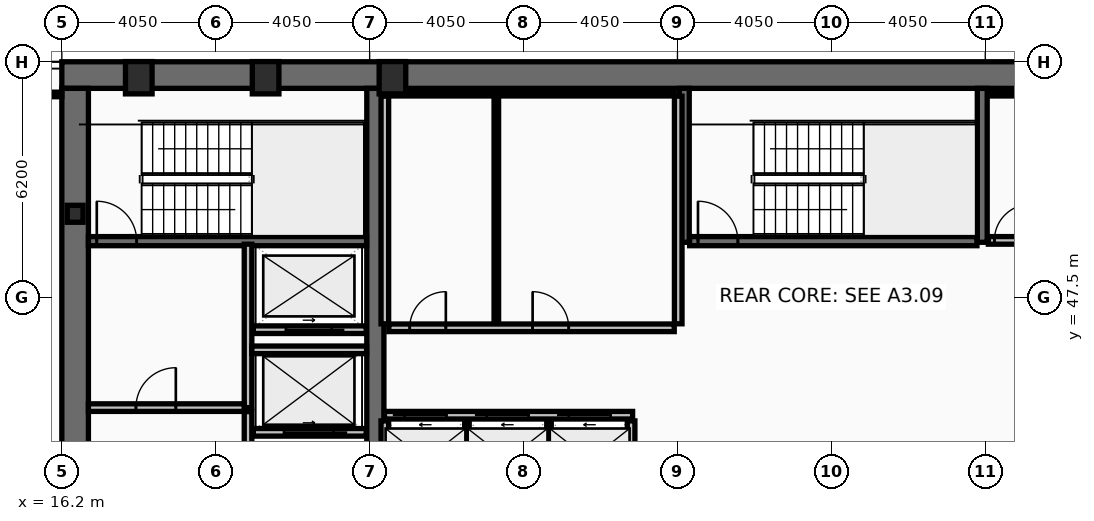
"""IFC4 building model, lengths in metres.
Left out: names, types, materials, properties, quantities, classifications, styles, units other than length and angle.
Written with IfcOpenShell. Run it as: python <this file> out.ifc"""

import sys

from ifc_helpers import new_model, si_unit, direction, frame, frame_2d, origin, origin_2d, place, context, subcontext, project, spatial, rectangle, hollow_rectangle, i_section, extrude, element, fill, save


model = new_model("IFC4")
c1 = context("Model", 3, precision=1e-05, world=origin(), true_north=direction((0.0, 1.0)))
c2 = subcontext(c1, "Body", "Model", "MODEL_VIEW")
j1 = project(units=[si_unit("LENGTHUNIT", "METRE"), si_unit("PLANEANGLEUNIT", "RADIAN")], contexts=[c1])
p1 = place(None, origin())
s1 = spatial("IfcSite", under=j1, at=p1, CompositionType="ELEMENT")
p2 = place(p1, origin())
s2 = spatial("IfcBuilding", under=s1, at=p2, CompositionType="ELEMENT")
p3 = place(p2, frame((0.0, 0.0, 125.4)))
s3 = spatial("IfcBuildingStorey", under=s2, at=p3, CompositionType="ELEMENT", Elevation=125.4)
p4 = place(p3, frame((16.2, 53.35, 0.0), z_axis=(0.0, 0.0, 1.0), x_axis=(1.0, 0.0, 0.0)))
e1 = element("IfcWall", 1, at=p4, inside=s3, PredefinedType="SHEAR", context=c2, shape_type="SweptSolid", body=[
    extrude(rectangle(XDim=40.5, YDim=0.7, at=frame_2d((20.25, 0.0))), origin(), (0.0, 0.0, 1.0), 3.44),
])
p5 = place(p3, frame((16.55, 42.0, 0.0), z_axis=(0.0, 0.0, 1.0), x_axis=(0.0, 1.0, 0.0)))
e2 = element("IfcWall", 2, at=p5, inside=s3, PredefinedType="SHEAR", context=c2, shape_type="SweptSolid", body=[
    extrude(rectangle(XDim=11.0, YDim=0.7, at=frame_2d((5.5, 0.0))), origin(), (0.0, 0.0, 1.0), 3.44),
])
p6 = place(p3, frame((24.45, 42.0, 0.0), z_axis=(0.0, 0.0, 1.0), x_axis=(0.0, 1.0, 0.0)))
e3 = element("IfcWall", 3, at=p6, inside=s3, PredefinedType="SHEAR", context=c2, shape_type="SweptSolid", body=[
    extrude(rectangle(XDim=11.0, YDim=0.45, at=frame_2d((5.5, 0.0))), origin(), (0.0, 0.0, 1.0), 3.44),
])
for number, where, z_axis, x_axis in (
    (4, (32.58, 48.95, 0.0), (0.0, 0.0, 1.0), (0.0, 1.0, 0.0)),
    (5, (40.42, 48.95, 0.0), (0.0, 0.0, 1.0), (0.0, 1.0, 0.0)),
):
    element("IfcWall", number, at=place(p3, frame(where, z_axis=z_axis, x_axis=x_axis)), inside=s3, PredefinedType="SHEAR", context=c2, shape_type="SweptSolid", body=[
        extrude(rectangle(XDim=4.05, YDim=0.26, at=frame_2d((2.025, 0.0))), origin(), (0.0, 0.0, 1.0), 3.44),
    ])
p7 = place(p3, frame((16.9, 48.98, 0.0), z_axis=(0.0, 0.0, 1.0), x_axis=(1.0, 0.0, 0.0)))
e6 = element("IfcWall", 6, at=p7, inside=s3, PredefinedType="SHEAR", context=c2, shape_type="SweptSolid", body=[
    extrude(rectangle(XDim=7.32, YDim=0.24, at=frame_2d((3.66, 0.0))), origin(), (0.0, 0.0, 1.0), 3.44),
])
p8 = place(p7, frame((0.22, 0.0, 0.0)))
e7 = element("IfcOpeningElement", 7, at=p8, cuts=e6, PredefinedType="OPENING", context=c2, shape_type="SweptSolid", body=[
    extrude(rectangle(XDim=1.05, YDim=2.15, at=frame_2d((0.525, 1.075))), frame((0.0, 0.13, 0.0), z_axis=(0.0, -1.0, 0.0), x_axis=(1.0, 0.0, 0.0)), (0.0, 0.0, 1.0), 0.26),
])
p9 = place(p3, frame((32.72, 48.98, 0.0), z_axis=(0.0, 0.0, 1.0), x_axis=(1.0, 0.0, 0.0)))
e8 = element("IfcWall", 8, at=p9, inside=s3, PredefinedType="SHEAR", context=c2, shape_type="SweptSolid", body=[
    extrude(rectangle(XDim=7.56, YDim=0.24, at=frame_2d((3.78, 0.0))), origin(), (0.0, 0.0, 1.0), 3.44),
])
p10 = place(p9, frame((0.22, 0.0, 0.0)))
e9 = element("IfcOpeningElement", 9, at=p10, cuts=e8, PredefinedType="OPENING", context=c2, shape_type="SweptSolid", body=[
    extrude(rectangle(XDim=1.05, YDim=2.15, at=frame_2d((0.525, 1.075))), frame((0.0, 0.13, 0.0), z_axis=(0.0, -1.0, 0.0), x_axis=(1.0, 0.0, 0.0)), (0.0, 0.0, 1.0), 0.26),
])
for number, where, z_axis, x_axis in (
    (10, (18.225, 53.28, 0.0), (0.0, 0.0, 1.0), (1.0, 0.0, 0.0)),
    (11, (21.562, 53.28, 0.0), (0.0, 0.0, 1.0), (1.0, 0.0, 0.0)),
    (12, (24.9, 53.28, 0.0), (0.0, 0.0, 1.0), (1.0, 0.0, 0.0)),
):
    element("IfcColumn", number, at=place(p3, frame(where, z_axis=z_axis, x_axis=x_axis)), inside=s3, PredefinedType="COLUMN", context=c2, shape_type="SweptSolid", body=[
        extrude(hollow_rectangle(XDim=0.7, YDim=0.85, WallThickness=0.05, at=origin_2d()), origin(), (0.0, 0.0, 1.0), 3.6),
    ])
p11 = place(p3, frame((16.55, 49.7, 0.0), z_axis=(0.0, 0.0, 1.0), x_axis=(1.0, 0.0, 0.0)))
e13 = element("IfcColumn", 13, at=p11, inside=s3, PredefinedType="COLUMN", context=c2, shape_type="SweptSolid", body=[
    extrude(i_section(OverallWidth=0.416, OverallDepth=0.446, WebThickness=0.039, FlangeThickness=0.063, at=origin_2d()), origin(), (0.0, 0.0, 1.0), 3.6),
])
p12 = place(p3, frame((24.69, 44.4, 0.0), z_axis=(0.0, 0.0, 1.0), x_axis=(1.0, 0.0, 0.0)))
e14 = element("IfcWall", 14, at=p12, inside=s3, PredefinedType="PARTITIONING", context=c2, shape_type="SweptSolid", body=[
    extrude(rectangle(XDim=6.53, YDim=0.2, at=frame_2d((3.265, 0.0))), origin(), (0.0, 0.0, 1.0), 3.44),
])
p13 = place(p12, frame((0.53, 0.0, 0.0)))
e15 = element("IfcOpeningElement", 15, at=p13, cuts=e14, PredefinedType="OPENING", context=c2, shape_type="SweptSolid", body=[
    extrude(rectangle(XDim=1.1, YDim=2.18, at=frame_2d((0.55, 1.09))), frame((0.0, 0.11, 0.0), z_axis=(0.0, -1.0, 0.0), x_axis=(1.0, 0.0, 0.0)), (0.0, 0.0, 1.0), 0.22),
])
p14 = place(p12, frame((2.69, 0.0, 0.0)))
e16 = element("IfcOpeningElement", 16, at=p14, cuts=e14, PredefinedType="OPENING", context=c2, shape_type="SweptSolid", body=[
    extrude(rectangle(XDim=1.1, YDim=2.18, at=frame_2d((0.55, 1.09))), frame((0.0, 0.11, 0.0), z_axis=(0.0, -1.0, 0.0), x_axis=(1.0, 0.0, 0.0)), (0.0, 0.0, 1.0), 0.22),
])
p15 = place(p12, frame((4.85, 0.0, 0.0)))
e17 = element("IfcOpeningElement", 17, at=p15, cuts=e14, PredefinedType="OPENING", context=c2, shape_type="SweptSolid", body=[
    extrude(rectangle(XDim=1.1, YDim=2.18, at=frame_2d((0.55, 1.09))), frame((0.0, 0.11, 0.0), z_axis=(0.0, -1.0, 0.0), x_axis=(1.0, 0.0, 0.0)), (0.0, 0.0, 1.0), 0.22),
])
p16 = place(p3, frame((24.21, 43.95, 0.0), z_axis=(0.0, 0.0, 1.0), x_axis=(-1.0, 0.0, 0.0)))
e18 = element("IfcWall", 18, at=p16, inside=s3, PredefinedType="PARTITIONING", context=c2, shape_type="SweptSolid", body=[
    extrude(rectangle(XDim=2.97, YDim=0.2, at=frame_2d((1.485, 0.0))), origin(), (0.0, 0.0, 1.0), 3.44),
])
p17 = place(p16, frame((0.86, 0.0, 0.0)))
e19 = element("IfcOpeningElement", 19, at=p17, cuts=e18, PredefinedType="OPENING", context=c2, shape_type="SweptSolid", body=[
    extrude(rectangle(XDim=1.3, YDim=2.18, at=frame_2d((0.65, 1.09))), frame((0.0, 0.11, 0.0), z_axis=(0.0, -1.0, 0.0), x_axis=(1.0, 0.0, 0.0)), (0.0, 0.0, 1.0), 0.22),
])
p18 = place(p3, frame((24.21, 46.65, 0.0), z_axis=(0.0, 0.0, 1.0), x_axis=(-1.0, 0.0, 0.0)))
e20 = element("IfcWall", 20, at=p18, inside=s3, PredefinedType="PARTITIONING", context=c2, shape_type="SweptSolid", body=[
    extrude(rectangle(XDim=2.97, YDim=0.2, at=frame_2d((1.485, 0.0))), origin(), (0.0, 0.0, 1.0), 3.44),
])
p19 = place(p18, frame((0.91, 0.0, 0.0)))
e21 = element("IfcOpeningElement", 21, at=p19, cuts=e20, PredefinedType="OPENING", context=c2, shape_type="SweptSolid", body=[
    extrude(rectangle(XDim=1.2, YDim=2.18, at=frame_2d((0.6, 1.09))), frame((0.0, 0.11, 0.0), z_axis=(0.0, -1.0, 0.0), x_axis=(1.0, 0.0, 0.0)), (0.0, 0.0, 1.0), 0.22),
])
p20 = place(p3, frame((21.1, 44.6, 0.0), z_axis=(0.0, 0.0, 1.0), x_axis=(0.0, 1.0, 0.0)))
e22 = element("IfcWall", 22, at=p20, inside=s3, PredefinedType="PARTITIONING", context=c2, shape_type="SweptSolid", body=[
    extrude(rectangle(XDim=4.3, YDim=0.2, at=frame_2d((2.15, 0.0))), origin(), (0.0, 0.0, 1.0), 3.44),
])
p21 = place(p3, frame((16.9, 44.6, 0.0), z_axis=(0.0, 0.0, 1.0), x_axis=(1.0, 0.0, 0.0)))
e23 = element("IfcWall", 23, at=p21, inside=s3, PredefinedType="PARTITIONING", context=c2, shape_type="SweptSolid", body=[
    extrude(rectangle(XDim=4.1, YDim=0.2, at=frame_2d((2.05, 0.0))), origin(), (0.0, 0.0, 1.0), 3.44),
])
p22 = place(p21, frame((1.25, 0.0, 0.0)))
e24 = element("IfcOpeningElement", 24, at=p22, cuts=e23, PredefinedType="OPENING", context=c2, shape_type="SweptSolid", body=[
    extrude(rectangle(XDim=1.05, YDim=2.15, at=frame_2d((0.525, 1.075))), frame((0.0, 0.11, 0.0), z_axis=(0.0, -1.0, 0.0), x_axis=(1.0, 0.0, 0.0)), (0.0, 0.0, 1.0), 0.22),
])
p23 = place(p3, frame((21.2, 46.12, 0.0), z_axis=(0.0, 0.0, 1.0), x_axis=(1.0, 0.0, 0.0)))
e25 = element("IfcWall", 25, at=p23, inside=s3, PredefinedType="PARTITIONING", context=c2, shape_type="SweptSolid", body=[
    extrude(rectangle(XDim=3.02, YDim=0.2, at=frame_2d((1.51, 0.0))), origin(), (0.0, 0.0, 1.0), 3.44),
])
p24 = place(p3, frame((21.1, 42.0, 0.0), z_axis=(0.0, 0.0, 1.0), x_axis=(0.0, 1.0, 0.0)))
e26 = element("IfcWall", 26, at=p24, inside=s3, PredefinedType="PARTITIONING", context=c2, shape_type="SweptSolid", body=[
    extrude(rectangle(XDim=2.495, YDim=0.2, at=frame_2d((1.248, 0.0))), origin(), (0.0, 0.0, 1.0), 3.44),
])
p25 = place(p24, frame((0.38, 0.0, 0.0)))
e27 = element("IfcOpeningElement", 27, at=p25, cuts=e26, PredefinedType="OPENING", context=c2, shape_type="SweptSolid", body=[
    extrude(rectangle(XDim=1.05, YDim=2.15, at=frame_2d((0.525, 1.075))), frame((0.0, 0.11, 0.0), z_axis=(0.0, -1.0, 0.0), x_axis=(1.0, 0.0, 0.0)), (0.0, 0.0, 1.0), 0.22),
])
for number, where, z_axis, x_axis in (
    (28, (24.7, 46.805, 0.0), (0.0, 0.0, 1.0), (0.0, 1.0, 0.0)),
    (29, (32.42, 46.805, 0.0), (0.0, 0.0, 1.0), (0.0, 1.0, 0.0)),
):
    element("IfcWall", number, at=place(p3, frame(where, z_axis=z_axis, x_axis=x_axis)), inside=s3, PredefinedType="PARTITIONING", context=c2, shape_type="SweptSolid", body=[
        extrude(rectangle(XDim=5.99, YDim=0.2, at=frame_2d((2.995, 0.0))), origin(), (0.0, 0.0, 1.0), 3.44),
    ])
p26 = place(p3, frame((24.805, 52.86, 0.0), z_axis=(0.0, 0.0, 1.0), x_axis=(1.0, 0.0, 0.0)))
e30 = element("IfcWall", 30, at=p26, inside=s3, PredefinedType="PARTITIONING", context=c2, shape_type="SweptSolid", body=[
    extrude(rectangle(XDim=7.51, YDim=0.12, at=frame_2d((3.755, 0.0))), origin(), (0.0, 0.0, 1.0), 3.44),
])
p27 = place(p3, frame((27.634, 46.805, 0.0), z_axis=(0.0, 0.0, 1.0), x_axis=(0.0, 1.0, 0.0)))
e31 = element("IfcWall", 31, at=p27, inside=s3, PredefinedType="PARTITIONING", context=c2, shape_type="SweptSolid", body=[
    extrude(rectangle(XDim=5.99, YDim=0.12, at=frame_2d((2.995, 0.0))), origin(), (0.0, 0.0, 1.0), 3.44),
])
p28 = place(p3, frame((24.805, 46.7, 0.0), z_axis=(0.0, 0.0, 1.0), x_axis=(1.0, 0.0, 0.0)))
e32 = element("IfcWall", 32, at=p28, inside=s3, PredefinedType="PARTITIONING", context=c2, shape_type="SweptSolid", body=[
    extrude(rectangle(XDim=7.51, YDim=0.2, at=frame_2d((3.755, 0.0))), origin(), (0.0, 0.0, 1.0), 3.44),
])
p29 = place(p28, frame((0.55, 0.0, 0.0)))
e33 = element("IfcOpeningElement", 33, at=p29, cuts=e32, PredefinedType="OPENING", context=c2, shape_type="SweptSolid", body=[
    extrude(rectangle(XDim=0.95, YDim=2.1, at=frame_2d((0.475, 1.05))), frame((0.0, 0.11, 0.0), z_axis=(0.0, -1.0, 0.0), x_axis=(1.0, 0.0, 0.0)), (0.0, 0.0, 1.0), 0.22),
])
p30 = place(p28, frame((3.784, 0.0, 0.0)))
e34 = element("IfcOpeningElement", 34, at=p30, cuts=e32, PredefinedType="OPENING", context=c2, shape_type="SweptSolid", body=[
    extrude(rectangle(XDim=0.95, YDim=2.1, at=frame_2d((0.475, 1.05))), frame((0.0, 0.11, 0.0), z_axis=(0.0, -1.0, 0.0), x_axis=(1.0, 0.0, 0.0)), (0.0, 0.0, 1.0), 0.22),
])
for number, where, z_axis, x_axis in (
    (35, (24.7, 42.05, 0.0), (0.0, 0.0, 1.0), (0.0, 1.0, 0.0)),
    (36, (31.18, 42.05, 0.0), (0.0, 0.0, 1.0), (0.0, 1.0, 0.0)),
):
    element("IfcWall", number, at=place(p3, frame(where, z_axis=z_axis, x_axis=x_axis)), inside=s3, PredefinedType="PARTITIONING", context=c2, shape_type="SweptSolid", body=[
        extrude(rectangle(XDim=2.2, YDim=0.2, at=frame_2d((1.1, 0.0))), origin(), (0.0, 0.0, 1.0), 3.44),
    ])
for number, where, z_axis, x_axis in (
    (37, (26.86, 42.05, 0.0), (0.0, 0.0, 1.0), (0.0, 1.0, 0.0)),
    (38, (29.02, 42.05, 0.0), (0.0, 0.0, 1.0), (0.0, 1.0, 0.0)),
):
    element("IfcWall", number, at=place(p3, frame(where, z_axis=z_axis, x_axis=x_axis)), inside=s3, PredefinedType="PARTITIONING", context=c2, shape_type="SweptSolid", body=[
        extrude(rectangle(XDim=2.2, YDim=0.12, at=frame_2d((1.1, 0.0))), origin(), (0.0, 0.0, 1.0), 3.44),
    ])
p31 = place(p3, frame((40.58, 52.86, 0.0), z_axis=(0.0, 0.0, 1.0), x_axis=(1.0, 0.0, 0.0)))
e39 = element("IfcWall", 39, at=p31, inside=s3, PredefinedType="PARTITIONING", context=c2, shape_type="SweptSolid", body=[
    extrude(rectangle(XDim=7.56, YDim=0.12, at=frame_2d((3.78, 0.0))), origin(), (0.0, 0.0, 1.0), 3.44),
])
p32 = place(p3, frame((40.58, 49.0, 0.0), z_axis=(0.0, 0.0, 1.0), x_axis=(1.0, 0.0, 0.0)))
e40 = element("IfcWall", 40, at=p32, inside=s3, PredefinedType="PARTITIONING", context=c2, shape_type="SweptSolid", body=[
    extrude(rectangle(XDim=7.56, YDim=0.2, at=frame_2d((3.78, 0.0))), origin(), (0.0, 0.0, 1.0), 3.44),
])
p33 = place(p32, frame((0.16, 0.0, 0.0)))
e41 = element("IfcOpeningElement", 41, at=p33, cuts=e40, PredefinedType="OPENING", context=c2, shape_type="SweptSolid", body=[
    extrude(rectangle(XDim=0.95, YDim=2.1, at=frame_2d((0.475, 1.05))), frame((0.0, 0.11, 0.0), z_axis=(0.0, -1.0, 0.0), x_axis=(1.0, 0.0, 0.0)), (0.0, 0.0, 1.0), 0.22),
])
p34 = place(p3, frame((4.095, 52.84, 0.0), z_axis=(0.0, 0.0, 1.0), x_axis=(1.0, 0.0, 0.0)))
e42 = element("IfcWall", 42, at=p34, inside=s3, PredefinedType="PARTITIONING", context=c2, shape_type="SweptSolid", body=[
    extrude(rectangle(XDim=12.105, YDim=0.12, at=frame_2d((6.052, 0.0))), origin(), (0.0, 0.0, 1.0), 3.44),
])
p35 = place(p8, origin())
e43 = element("IfcDoor", 43, at=p35, inside=s3, OperationType="SINGLE_SWING_LEFT", PredefinedType="DOOR", context=c2, shape_type="SweptSolid", body=[
    extrude(rectangle(XDim=1.05, YDim=2.15, at=frame_2d((0.525, 1.075))), frame((0.0, 0.025, 0.0), z_axis=(0.0, -1.0, 0.0), x_axis=(1.0, 0.0, 0.0)), (0.0, 0.0, 1.0), 0.05),
])
fill(e7, e43)
p36 = place(p10, origin())
e44 = element("IfcDoor", 44, at=p36, inside=s3, OperationType="SINGLE_SWING_LEFT", PredefinedType="DOOR", context=c2, shape_type="SweptSolid", body=[
    extrude(rectangle(XDim=1.05, YDim=2.15, at=frame_2d((0.525, 1.075))), frame((0.0, 0.025, 0.0), z_axis=(0.0, -1.0, 0.0), x_axis=(1.0, 0.0, 0.0)), (0.0, 0.0, 1.0), 0.05),
])
fill(e9, e44)
p37 = place(p13, origin())
e45 = element("IfcDoor", 45, at=p37, inside=s3, OperationType="SLIDING_TO_LEFT", PredefinedType="DOOR", context=c2, shape_type="SweptSolid", body=[
    extrude(rectangle(XDim=1.1, YDim=2.18, at=frame_2d((0.55, 1.09))), frame((0.0, 0.025, 0.0), z_axis=(0.0, -1.0, 0.0), x_axis=(1.0, 0.0, 0.0)), (0.0, 0.0, 1.0), 0.05),
])
fill(e15, e45)
p38 = place(p14, origin())
e46 = element("IfcDoor", 46, at=p38, inside=s3, OperationType="SLIDING_TO_LEFT", PredefinedType="DOOR", context=c2, shape_type="SweptSolid", body=[
    extrude(rectangle(XDim=1.1, YDim=2.18, at=frame_2d((0.55, 1.09))), frame((0.0, 0.025, 0.0), z_axis=(0.0, -1.0, 0.0), x_axis=(1.0, 0.0, 0.0)), (0.0, 0.0, 1.0), 0.05),
])
fill(e16, e46)
p39 = place(p15, origin())
e47 = element("IfcDoor", 47, at=p39, inside=s3, OperationType="SLIDING_TO_LEFT", PredefinedType="DOOR", context=c2, shape_type="SweptSolid", body=[
    extrude(rectangle(XDim=1.1, YDim=2.18, at=frame_2d((0.55, 1.09))), frame((0.0, 0.025, 0.0), z_axis=(0.0, -1.0, 0.0), x_axis=(1.0, 0.0, 0.0)), (0.0, 0.0, 1.0), 0.05),
])
fill(e17, e47)
p40 = place(p17, origin())
e48 = element("IfcDoor", 48, at=p40, inside=s3, OperationType="SLIDING_TO_LEFT", PredefinedType="DOOR", context=c2, shape_type="SweptSolid", body=[
    extrude(rectangle(XDim=1.3, YDim=2.18, at=frame_2d((0.65, 1.09))), frame((0.0, 0.025, 0.0), z_axis=(0.0, -1.0, 0.0), x_axis=(1.0, 0.0, 0.0)), (0.0, 0.0, 1.0), 0.05),
])
fill(e19, e48)
p41 = place(p19, origin())
e49 = element("IfcDoor", 49, at=p41, inside=s3, OperationType="SLIDING_TO_LEFT", PredefinedType="DOOR", context=c2, shape_type="SweptSolid", body=[
    extrude(rectangle(XDim=1.2, YDim=2.18, at=frame_2d((0.6, 1.09))), frame((0.0, 0.025, 0.0), z_axis=(0.0, -1.0, 0.0), x_axis=(1.0, 0.0, 0.0)), (0.0, 0.0, 1.0), 0.05),
])
fill(e21, e49)
p42 = place(p22, origin())
e50 = element("IfcDoor", 50, at=p42, inside=s3, OperationType="SINGLE_SWING_RIGHT", PredefinedType="DOOR", context=c2, shape_type="SweptSolid", body=[
    extrude(rectangle(XDim=1.05, YDim=2.15, at=frame_2d((0.525, 1.075))), frame((0.0, 0.025, 0.0), z_axis=(0.0, -1.0, 0.0), x_axis=(1.0, 0.0, 0.0)), (0.0, 0.0, 1.0), 0.05),
])
fill(e24, e50)
p43 = place(p29, origin())
e51 = element("IfcDoor", 51, at=p43, inside=s3, OperationType="SINGLE_SWING_RIGHT", PredefinedType="DOOR", context=c2, shape_type="SweptSolid", body=[
    extrude(rectangle(XDim=0.95, YDim=2.1, at=frame_2d((0.475, 1.05))), frame((0.0, 0.025, 0.0), z_axis=(0.0, -1.0, 0.0), x_axis=(1.0, 0.0, 0.0)), (0.0, 0.0, 1.0), 0.05),
])
fill(e33, e51)
p44 = place(p30, origin())
e52 = element("IfcDoor", 52, at=p44, inside=s3, OperationType="SINGLE_SWING_LEFT", PredefinedType="DOOR", context=c2, shape_type="SweptSolid", body=[
    extrude(rectangle(XDim=0.95, YDim=2.1, at=frame_2d((0.475, 1.05))), frame((0.0, 0.025, 0.0), z_axis=(0.0, -1.0, 0.0), x_axis=(1.0, 0.0, 0.0)), (0.0, 0.0, 1.0), 0.05),
])
fill(e34, e52)
p45 = place(p33, origin())
e53 = element("IfcDoor", 53, at=p45, inside=s3, OperationType="SINGLE_SWING_RIGHT", PredefinedType="DOOR", context=c2, shape_type="SweptSolid", body=[
    extrude(rectangle(XDim=0.95, YDim=2.1, at=frame_2d((0.475, 1.05))), frame((0.0, 0.025, 0.0), z_axis=(0.0, -1.0, 0.0), x_axis=(1.0, 0.0, 0.0)), (0.0, 0.0, 1.0), 0.05),
])
fill(e41, e53)
save(model, sys.argv[1])
